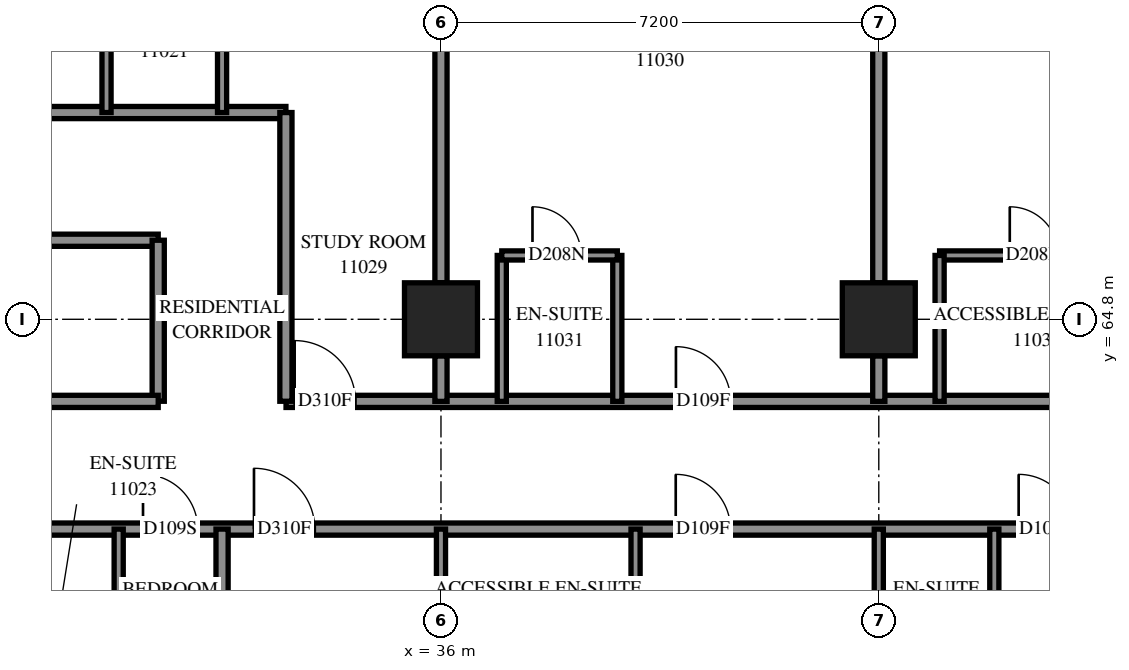
"""IFC4 building model, lengths in metres.
Left out: names, types, materials, properties, quantities, classifications, styles, units other than length and angle.
Written with IfcOpenShell. Run it as: python <this file> out.ifc"""

import sys

from ifc_helpers import new_model, si_unit, direction, frame, frame_2d, origin, origin_2d, place, context, subcontext, project, spatial, rectangle, extrude, element, fill, save


model = new_model("IFC4")
c1 = context("Model", 3, precision=1e-05, world=origin(), true_north=direction((0.0, 1.0)))
c2 = subcontext(c1, "Body", "Model", "MODEL_VIEW")
j1 = project(units=[si_unit("LENGTHUNIT", "METRE"), si_unit("PLANEANGLEUNIT", "RADIAN")], contexts=[c1])
p1 = place(None, origin())
s1 = spatial("IfcSite", under=j1, at=p1, CompositionType="ELEMENT")
p2 = place(p1, origin())
s2 = spatial("IfcBuilding", under=s1, at=p2, CompositionType="ELEMENT")
p3 = place(p2, frame((0.0, 0.0, 44.0)))
s3 = spatial("IfcBuildingStorey", under=s2, at=p3, CompositionType="ELEMENT", Elevation=44.0)
for number, where, z_axis, x_axis in (
    (1, (36.0, 64.8, 0.0), (0.0, 0.0, 1.0), (1.0, 0.0, 0.0)),
    (2, (43.2, 64.8, 0.0), (0.0, 0.0, 1.0), (1.0, 0.0, 0.0)),
):
    element("IfcColumn", number, at=place(p3, frame(where, z_axis=z_axis, x_axis=x_axis)), inside=s3, PredefinedType="COLUMN", context=c2, shape_type="SweptSolid", body=[
        extrude(rectangle(XDim=1.2, YDim=1.2, at=origin_2d()), origin(), (0.0, 0.0, 1.0), 3.1),
    ])
p4 = place(p3, frame((28.8, 61.35, 0.0), z_axis=(0.0, 0.0, 1.0), x_axis=(1.0, 0.0, 0.0)))
e3 = element("IfcWall", 3, at=p4, inside=s3, PredefinedType="PARTITIONING", context=c2, shape_type="SweptSolid", body=[
    extrude(rectangle(XDim=24.15, YDim=0.2, at=frame_2d((12.075, 0.0))), origin(), (0.0, 0.0, 1.0), 3.1),
])
p5 = place(p4, frame((2.3, 0.0, 0.0)))
e4 = element("IfcOpeningElement", 4, at=p5, cuts=e3, PredefinedType="OPENING", context=c2, shape_type="SweptSolid", body=[
    extrude(rectangle(XDim=0.9, YDim=2.1, at=frame_2d((0.45, 1.05))), frame((0.0, 0.11, 0.0), z_axis=(0.0, -1.0, 0.0), x_axis=(1.0, 0.0, 0.0)), (0.0, 0.0, 1.0), 0.22),
])
p6 = place(p4, frame((4.125, 0.0, 0.0)))
e5 = element("IfcOpeningElement", 5, at=p6, cuts=e3, PredefinedType="OPENING", context=c2, shape_type="SweptSolid", body=[
    extrude(rectangle(XDim=1.0, YDim=2.1, at=frame_2d((0.5, 1.05))), frame((0.0, 0.11, 0.0), z_axis=(0.0, -1.0, 0.0), x_axis=(1.0, 0.0, 0.0)), (0.0, 0.0, 1.0), 0.22),
])
p7 = place(p4, frame((11.061, 0.0, 0.0)))
e6 = element("IfcOpeningElement", 6, at=p7, cuts=e3, PredefinedType="OPENING", context=c2, shape_type="SweptSolid", body=[
    extrude(rectangle(XDim=0.9, YDim=2.1, at=frame_2d((0.45, 1.05))), frame((0.0, 0.11, 0.0), z_axis=(0.0, -1.0, 0.0), x_axis=(1.0, 0.0, 0.0)), (0.0, 0.0, 1.0), 0.22),
])
p8 = place(p4, frame((16.7, 0.0, 0.0)))
e7 = element("IfcOpeningElement", 7, at=p8, cuts=e3, PredefinedType="OPENING", context=c2, shape_type="SweptSolid", body=[
    extrude(rectangle(XDim=0.9, YDim=2.1, at=frame_2d((0.45, 1.05))), frame((0.0, 0.11, 0.0), z_axis=(0.0, -1.0, 0.0), x_axis=(1.0, 0.0, 0.0)), (0.0, 0.0, 1.0), 0.22),
])
p9 = place(p4, frame((18.508, 0.0, 0.0)))
e8 = element("IfcOpeningElement", 8, at=p9, cuts=e3, PredefinedType="OPENING", context=c2, shape_type="SweptSolid", body=[
    extrude(rectangle(XDim=1.0, YDim=2.1, at=frame_2d((0.5, 1.05))), frame((0.0, 0.11, 0.0), z_axis=(0.0, -1.0, 0.0), x_axis=(1.0, 0.0, 0.0)), (0.0, 0.0, 1.0), 0.22),
])
p10 = place(p4, frame((22.882, 0.0, 0.0)))
e9 = element("IfcOpeningElement", 9, at=p10, cuts=e3, PredefinedType="OPENING", context=c2, shape_type="SweptSolid", body=[
    extrude(rectangle(XDim=1.0, YDim=2.1, at=frame_2d((0.5, 1.05))), frame((0.0, 0.11, 0.0), z_axis=(0.0, -1.0, 0.0), x_axis=(1.0, 0.0, 0.0)), (0.0, 0.0, 1.0), 0.22),
])
p11 = place(p3, frame((33.452, 63.45, 0.0), z_axis=(0.0, 0.0, 1.0), x_axis=(1.0, 0.0, 0.0)))
e10 = element("IfcWall", 10, at=p11, inside=s3, PredefinedType="PARTITIONING", context=c2, shape_type="SweptSolid", body=[
    extrude(rectangle(XDim=21.648, YDim=0.2, at=frame_2d((10.824, 0.0))), origin(), (0.0, 0.0, 1.0), 3.1),
])
p12 = place(p11, frame((0.142, 0.0, 0.0)))
e11 = element("IfcOpeningElement", 11, at=p12, cuts=e10, PredefinedType="OPENING", context=c2, shape_type="SweptSolid", body=[
    extrude(rectangle(XDim=1.0, YDim=2.1, at=frame_2d((0.5, 1.05))), frame((0.0, 0.11, 0.0), z_axis=(0.0, -1.0, 0.0), x_axis=(1.0, 0.0, 0.0)), (0.0, 0.0, 1.0), 0.22),
])
p13 = place(p11, frame((6.412, 0.0, 0.0)))
e12 = element("IfcOpeningElement", 12, at=p13, cuts=e10, PredefinedType="OPENING", context=c2, shape_type="SweptSolid", body=[
    extrude(rectangle(XDim=0.9, YDim=2.1, at=frame_2d((0.45, 1.05))), frame((0.0, 0.11, 0.0), z_axis=(0.0, -1.0, 0.0), x_axis=(1.0, 0.0, 0.0)), (0.0, 0.0, 1.0), 0.22),
])
p14 = place(p11, frame((14.168, 0.0, 0.0)))
e13 = element("IfcOpeningElement", 13, at=p14, cuts=e10, PredefinedType="OPENING", context=c2, shape_type="SweptSolid", body=[
    extrude(rectangle(XDim=0.9, YDim=2.1, at=frame_2d((0.45, 1.05))), frame((0.0, 0.11, 0.0), z_axis=(0.0, -1.0, 0.0), x_axis=(1.0, 0.0, 0.0)), (0.0, 0.0, 1.0), 0.22),
])
p15 = place(p11, frame((17.651, 0.0, 0.0)))
e14 = element("IfcOpeningElement", 14, at=p15, cuts=e10, PredefinedType="OPENING", context=c2, shape_type="SweptSolid", body=[
    extrude(rectangle(XDim=0.9, YDim=2.1, at=frame_2d((0.45, 1.05))), frame((0.0, 0.11, 0.0), z_axis=(0.0, -1.0, 0.0), x_axis=(1.0, 0.0, 0.0)), (0.0, 0.0, 1.0), 0.22),
])
p16 = place(p3, frame((21.602, 68.2, 0.0), z_axis=(0.0, 0.0, 1.0), x_axis=(1.0, 0.0, 0.0)))
e15 = element("IfcWall", 15, at=p16, inside=s3, PredefinedType="PARTITIONING", context=c2, shape_type="SweptSolid", body=[
    extrude(rectangle(XDim=11.848, YDim=0.2, at=frame_2d((5.924, 0.0))), origin(), (0.0, 0.0, 1.0), 3.1),
])
p17 = place(p16, frame((5.855, 0.0, 0.0)))
e16 = element("IfcOpeningElement", 16, at=p17, cuts=e15, PredefinedType="OPENING", context=c2, shape_type="SweptSolid", body=[
    extrude(rectangle(XDim=0.9, YDim=2.1, at=frame_2d((0.45, 1.05))), frame((0.0, 0.11, 0.0), z_axis=(0.0, -1.0, 0.0), x_axis=(1.0, 0.0, 0.0)), (0.0, 0.0, 1.0), 0.22),
])
p18 = place(p3, frame((21.602, 66.1, 0.0), z_axis=(0.0, 0.0, 1.0), x_axis=(1.0, 0.0, 0.0)))
e17 = element("IfcWall", 17, at=p18, inside=s3, PredefinedType="PARTITIONING", context=c2, shape_type="SweptSolid", body=[
    extrude(rectangle(XDim=9.748, YDim=0.2, at=frame_2d((4.874, 0.0))), origin(), (0.0, 0.0, 1.0), 3.1),
])
p19 = place(p18, frame((1.791, 0.0, 0.0)))
e18 = element("IfcOpeningElement", 18, at=p19, cuts=e17, PredefinedType="OPENING", context=c2, shape_type="SweptSolid", body=[
    extrude(rectangle(XDim=1.0, YDim=2.1, at=frame_2d((0.5, 1.05))), frame((0.0, 0.11, 0.0), z_axis=(0.0, -1.0, 0.0), x_axis=(1.0, 0.0, 0.0)), (0.0, 0.0, 1.0), 0.22),
])
p20 = place(p18, frame((5.3, 0.0, 0.0)))
e19 = element("IfcOpeningElement", 19, at=p20, cuts=e17, PredefinedType="OPENING", context=c2, shape_type="SweptSolid", body=[
    extrude(rectangle(XDim=1.0, YDim=2.1, at=frame_2d((0.5, 1.05))), frame((0.0, 0.11, 0.0), z_axis=(0.0, -1.0, 0.0), x_axis=(1.0, 0.0, 0.0)), (0.0, 0.0, 1.0), 0.22),
])
for number, where, z_axis, x_axis in (
    (20, (36.0, 65.4, 0.0), (0.0, 0.0, 1.0), (0.0, 1.0, 0.0)),
    (21, (43.2, 65.4, 0.0), (0.0, 0.0, 1.0), (0.0, 1.0, 0.0)),
):
    element("IfcWall", number, at=place(p3, frame(where, z_axis=z_axis, x_axis=x_axis)), inside=s3, PredefinedType="PARTITIONING", context=c2, shape_type="SweptSolid", body=[
        extrude(rectangle(XDim=6.0, YDim=0.2, at=frame_2d((3.0, 0.0))), origin(), (0.0, 0.0, 1.0), 3.1),
    ])
p21 = place(p3, frame((33.45, 63.452, 0.0), z_axis=(0.0, 0.0, 1.0), x_axis=(0.0, 1.0, 0.0)))
e22 = element("IfcWall", 22, at=p21, inside=s3, PredefinedType="PARTITIONING", context=c2, shape_type="SweptSolid", body=[
    extrude(rectangle(XDim=4.748, YDim=0.2, at=frame_2d((2.374, 0.0))), origin(), (0.0, 0.0, 1.0), 3.1),
])
p22 = place(p3, frame((32.4, 56.95, 0.0), z_axis=(0.0, 0.0, 1.0), x_axis=(0.0, 1.0, 0.0)))
e23 = element("IfcWall", 23, at=p22, inside=s3, PredefinedType="PARTITIONING", context=c2, shape_type="SweptSolid", body=[
    extrude(rectangle(XDim=4.4, YDim=0.2, at=frame_2d((2.2, 0.0))), origin(), (0.0, 0.0, 1.0), 3.1),
])
p23 = place(p3, frame((44.2, 65.85, 0.0), z_axis=(0.0, 0.0, 1.0), x_axis=(1.0, 0.0, 0.0)))
e24 = element("IfcWall", 24, at=p23, inside=s3, PredefinedType="PARTITIONING", context=c2, shape_type="SweptSolid", body=[
    extrude(rectangle(XDim=3.2, YDim=0.15, at=frame_2d((1.6, 0.0))), origin(), (0.0, 0.0, 1.0), 3.1),
])
p24 = place(p23, frame((1.154, 0.0, 0.0)))
e25 = element("IfcOpeningElement", 25, at=p24, cuts=e24, PredefinedType="OPENING", context=c2, shape_type="SweptSolid", body=[
    extrude(rectangle(XDim=0.8, YDim=2.1, at=frame_2d((0.4, 1.05))), frame((0.0, 0.085, 0.0), z_axis=(0.0, -1.0, 0.0), x_axis=(1.0, 0.0, 0.0)), (0.0, 0.0, 1.0), 0.17),
])
p25 = place(p3, frame((31.35, 63.452, 0.0), z_axis=(0.0, 0.0, 1.0), x_axis=(0.0, 1.0, 0.0)))
e26 = element("IfcWall", 26, at=p25, inside=s3, PredefinedType="PARTITIONING", context=c2, shape_type="SweptSolid", body=[
    extrude(rectangle(XDim=2.648, YDim=0.2, at=frame_2d((1.324, 0.0))), origin(), (0.0, 0.0, 1.0), 3.1),
])
p26 = place(p3, frame((28.802, 63.45, 0.0), z_axis=(0.0, 0.0, 1.0), x_axis=(1.0, 0.0, 0.0)))
e27 = element("IfcWall", 27, at=p26, inside=s3, PredefinedType="PARTITIONING", context=c2, shape_type="SweptSolid", body=[
    extrude(rectangle(XDim=2.548, YDim=0.2, at=frame_2d((1.274, 0.0))), origin(), (0.0, 0.0, 1.0), 3.1),
])
for number, where, z_axis, x_axis in (
    (28, (30.7, 58.95, 0.0), (0.0, 0.0, 1.0), (0.0, 1.0, 0.0)),
    (29, (39.2, 58.95, 0.0), (0.0, 0.0, 1.0), (0.0, 1.0, 0.0)),
    (30, (36.0, 58.95, 0.0), (0.0, 0.0, 1.0), (0.0, 1.0, 0.0)),
    (31, (45.1, 58.95, 0.0), (0.0, 0.0, 1.0), (0.0, 1.0, 0.0)),
    (32, (43.2, 58.95, 0.0), (0.0, 0.0, 1.0), (0.0, 1.0, 0.0)),
    (33, (30.5, 68.2, 0.0), (0.0, 0.0, 1.0), (0.0, 1.0, 0.0)),
    (34, (32.4, 68.2, 0.0), (0.0, 0.0, 1.0), (0.0, 1.0, 0.0)),
    (35, (37.0, 63.45, 0.0), (0.0, 0.0, 1.0), (0.0, 1.0, 0.0)),
    (36, (38.9, 63.45, 0.0), (0.0, 0.0, 1.0), (0.0, 1.0, 0.0)),
    (37, (44.2, 63.45, 0.0), (0.0, 0.0, 1.0), (0.0, 1.0, 0.0)),
):
    element("IfcWall", number, at=place(p3, frame(where, z_axis=z_axis, x_axis=x_axis)), inside=s3, PredefinedType="PARTITIONING", context=c2, shape_type="SweptSolid", body=[
        extrude(rectangle(XDim=2.4, YDim=0.15, at=frame_2d((1.2, 0.0))), origin(), (0.0, 0.0, 1.0), 3.1),
    ])
p27 = place(p3, frame((37.0, 65.85, 0.0), z_axis=(0.0, 0.0, 1.0), x_axis=(1.0, 0.0, 0.0)))
e38 = element("IfcWall", 38, at=p27, inside=s3, PredefinedType="PARTITIONING", context=c2, shape_type="SweptSolid", body=[
    extrude(rectangle(XDim=1.9, YDim=0.15, at=frame_2d((0.95, 0.0))), origin(), (0.0, 0.0, 1.0), 3.1),
])
p28 = place(p27, frame((0.505, 0.0, 0.0)))
e39 = element("IfcOpeningElement", 39, at=p28, cuts=e38, PredefinedType="OPENING", context=c2, shape_type="SweptSolid", body=[
    extrude(rectangle(XDim=0.8, YDim=2.1, at=frame_2d((0.4, 1.05))), frame((0.0, 0.085, 0.0), z_axis=(0.0, -1.0, 0.0), x_axis=(1.0, 0.0, 0.0)), (0.0, 0.0, 1.0), 0.17),
])
for number, where, z_axis, x_axis in (
    (40, (36.0, 63.45, 0.0), (0.0, 0.0, 1.0), (0.0, 1.0, 0.0)),
    (41, (43.2, 63.45, 0.0), (0.0, 0.0, 1.0), (0.0, 1.0, 0.0)),
):
    element("IfcWall", number, at=place(p3, frame(where, z_axis=z_axis, x_axis=x_axis)), inside=s3, PredefinedType="PARTITIONING", context=c2, shape_type="SweptSolid", body=[
        extrude(rectangle(XDim=0.75, YDim=0.2, at=frame_2d((0.375, 0.0))), origin(), (0.0, 0.0, 1.0), 3.1),
    ])
p29 = place(p5, origin())
e42 = element("IfcDoor", 42, at=p29, inside=s3, OperationType="SINGLE_SWING_LEFT", PredefinedType="DOOR", context=c2, shape_type="SweptSolid", body=[
    extrude(rectangle(XDim=0.9, YDim=2.1, at=frame_2d((0.45, 1.05))), frame((0.0, 0.025, 0.0), z_axis=(0.0, -1.0, 0.0), x_axis=(1.0, 0.0, 0.0)), (0.0, 0.0, 1.0), 0.05),
])
fill(e4, e42)
p30 = place(p6, origin())
e43 = element("IfcDoor", 43, at=p30, inside=s3, OperationType="SINGLE_SWING_RIGHT", PredefinedType="DOOR", context=c2, shape_type="SweptSolid", body=[
    extrude(rectangle(XDim=1.0, YDim=2.1, at=frame_2d((0.5, 1.05))), frame((0.0, 0.025, 0.0), z_axis=(0.0, -1.0, 0.0), x_axis=(1.0, 0.0, 0.0)), (0.0, 0.0, 1.0), 0.05),
])
fill(e5, e43)
p31 = place(p7, origin())
e44 = element("IfcDoor", 44, at=p31, inside=s3, OperationType="SINGLE_SWING_LEFT", PredefinedType="DOOR", context=c2, shape_type="SweptSolid", body=[
    extrude(rectangle(XDim=0.9, YDim=2.1, at=frame_2d((0.45, 1.05))), frame((0.0, 0.025, 0.0), z_axis=(0.0, -1.0, 0.0), x_axis=(1.0, 0.0, 0.0)), (0.0, 0.0, 1.0), 0.05),
])
fill(e6, e44)
p32 = place(p8, origin())
e45 = element("IfcDoor", 45, at=p32, inside=s3, OperationType="SINGLE_SWING_LEFT", PredefinedType="DOOR", context=c2, shape_type="SweptSolid", body=[
    extrude(rectangle(XDim=0.9, YDim=2.1, at=frame_2d((0.45, 1.05))), frame((0.0, 0.025, 0.0), z_axis=(0.0, -1.0, 0.0), x_axis=(1.0, 0.0, 0.0)), (0.0, 0.0, 1.0), 0.05),
])
fill(e7, e45)
p33 = place(p12, origin())
e46 = element("IfcDoor", 46, at=p33, inside=s3, OperationType="SINGLE_SWING_LEFT", PredefinedType="DOOR", context=c2, shape_type="SweptSolid", body=[
    extrude(rectangle(XDim=1.0, YDim=2.1, at=frame_2d((0.5, 1.05))), frame((0.0, 0.025, 0.0), z_axis=(0.0, -1.0, 0.0), x_axis=(1.0, 0.0, 0.0)), (0.0, 0.0, 1.0), 0.05),
])
fill(e11, e46)
p34 = place(p13, origin())
e47 = element("IfcDoor", 47, at=p34, inside=s3, OperationType="SINGLE_SWING_RIGHT", PredefinedType="DOOR", context=c2, shape_type="SweptSolid", body=[
    extrude(rectangle(XDim=0.9, YDim=2.1, at=frame_2d((0.45, 1.05))), frame((0.0, 0.025, 0.0), z_axis=(0.0, -1.0, 0.0), x_axis=(1.0, 0.0, 0.0)), (0.0, 0.0, 1.0), 0.05),
])
fill(e12, e47)
p35 = place(p28, origin())
e48 = element("IfcDoor", 48, at=p35, inside=s3, OperationType="SINGLE_SWING_RIGHT", PredefinedType="DOOR", context=c2, shape_type="SweptSolid", body=[
    extrude(rectangle(XDim=0.8, YDim=2.1, at=frame_2d((0.4, 1.05))), frame((0.0, 0.025, 0.0), z_axis=(0.0, -1.0, 0.0), x_axis=(1.0, 0.0, 0.0)), (0.0, 0.0, 1.0), 0.05),
])
fill(e39, e48)
p36 = place(p24, origin())
e49 = element("IfcDoor", 49, at=p36, inside=s3, OperationType="SINGLE_SWING_RIGHT", PredefinedType="DOOR", context=c2, shape_type="SweptSolid", body=[
    extrude(rectangle(XDim=0.8, YDim=2.1, at=frame_2d((0.4, 1.05))), frame((0.0, 0.025, 0.0), z_axis=(0.0, -1.0, 0.0), x_axis=(1.0, 0.0, 0.0)), (0.0, 0.0, 1.0), 0.05),
])
fill(e25, e49)
save(model, sys.argv[1])
